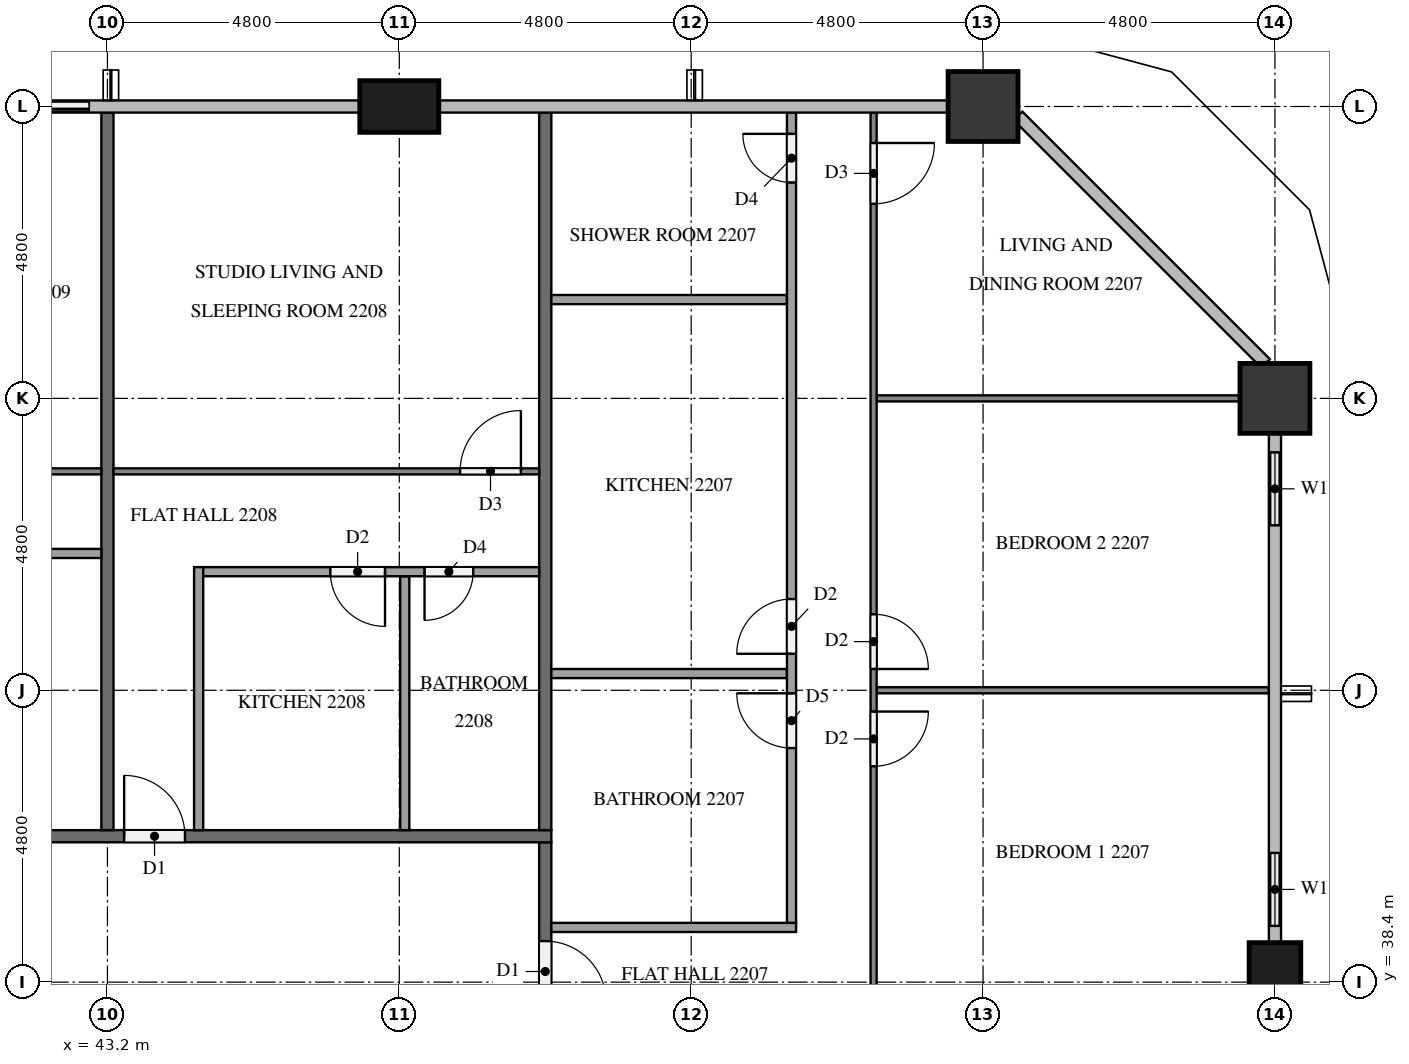
"""IFC4 building model, lengths in metres.
Left out: names, types, materials, properties, quantities, classifications, styles, units other than length and angle.
Written with IfcOpenShell. Run it as: python <this file> out.ifc"""

import sys

from ifc_helpers import new_model, si_unit, direction, frame, frame_2d, origin, origin_2d, place, context, subcontext, project, spatial, rectangle, extrude, element, fill, save


model = new_model("IFC4")
c1 = context("Model", 3, precision=1e-05, world=origin(), true_north=direction((0.0, 1.0)))
c2 = subcontext(c1, "Body", "Model", "MODEL_VIEW")
j1 = project(units=[si_unit("LENGTHUNIT", "METRE"), si_unit("PLANEANGLEUNIT", "RADIAN")], contexts=[c1])
p1 = place(None, origin())
s1 = spatial("IfcSite", under=j1, at=p1, CompositionType="ELEMENT")
p2 = place(p1, origin())
s2 = spatial("IfcBuilding", under=s1, at=p2, CompositionType="ELEMENT")
p3 = place(p2, frame((0.0, 0.0, 89.2)))
s3 = spatial("IfcBuildingStorey", under=s2, at=p3, CompositionType="ELEMENT", Elevation=89.2)
p4 = place(p3, frame((62.4, 38.4, 0.0), z_axis=(0.0, 0.0, 1.0), x_axis=(0.0, 1.0, 0.0)))
e1 = element("IfcColumn", 1, at=p4, inside=s3, PredefinedType="COLUMN", context=c2, shape_type="SweptSolid", body=[
    extrude(rectangle(XDim=1.3, YDim=0.85, at=origin_2d()), origin(), (0.0, 0.0, 1.0), 3.2),
])
for number, where, z_axis, x_axis in (
    (2, (62.4, 48.0, 0.0), (0.0, 0.0, 1.0), (1.0, 0.0, 0.0)),
    (3, (57.6, 52.8, 0.0), (0.0, 0.0, 1.0), (1.0, 0.0, 0.0)),
):
    element("IfcColumn", number, at=place(p3, frame(where, z_axis=z_axis, x_axis=x_axis)), inside=s3, PredefinedType="COLUMN", context=c2, shape_type="SweptSolid", body=[
        extrude(rectangle(XDim=1.15, YDim=1.15, at=origin_2d()), origin(), (0.0, 0.0, 1.0), 3.2),
    ])
p5 = place(p3, frame((48.0, 52.8, 0.0), z_axis=(0.0, 0.0, 1.0), x_axis=(1.0, 0.0, 0.0)))
e4 = element("IfcColumn", 4, at=p5, inside=s3, PredefinedType="COLUMN", context=c2, shape_type="SweptSolid", body=[
    extrude(rectangle(XDim=1.3, YDim=0.85, at=origin_2d()), origin(), (0.0, 0.0, 1.0), 3.2),
])
p6 = place(p3, frame((62.4, 39.05, 0.0), z_axis=(0.0, 0.0, 1.0), x_axis=(0.0, 1.0, 0.0)))
e5 = element("IfcWall", 5, at=p6, inside=s3, PredefinedType="SOLIDWALL", context=c2, shape_type="SweptSolid", body=[
    extrude(rectangle(XDim=1.75, YDim=0.15, at=frame_2d((0.875, 0.0))), origin(), (0.0, 0.0, 1.0), 3.2),
])
p7 = place(p6, frame((0.275, 0.0, 0.9)))
e6 = element("IfcOpeningElement", 6, at=p7, cuts=e5, PredefinedType="OPENING", context=c2, shape_type="SweptSolid", body=[
    extrude(rectangle(XDim=1.2, YDim=1.4, at=frame_2d((0.6, 0.7))), frame((0.0, 0.085, 0.0), z_axis=(0.0, -1.0, 0.0), x_axis=(1.0, 0.0, 0.0)), (0.0, 0.0, 1.0), 0.17),
])
p8 = place(p3, frame((62.4, 45.6, 0.0), z_axis=(0.0, 0.0, 1.0), x_axis=(0.0, 1.0, 0.0)))
e7 = element("IfcWall", 7, at=p8, inside=s3, PredefinedType="SOLIDWALL", context=c2, shape_type="SweptSolid", body=[
    extrude(rectangle(XDim=1.825, YDim=0.15, at=frame_2d((0.913, 0.0))), origin(), (0.0, 0.0, 1.0), 3.2),
])
p9 = place(p8, frame((0.312, 0.0, 0.9)))
e8 = element("IfcOpeningElement", 8, at=p9, cuts=e7, PredefinedType="OPENING", context=c2, shape_type="SweptSolid", body=[
    extrude(rectangle(XDim=1.2, YDim=1.4, at=frame_2d((0.6, 0.7))), frame((0.0, 0.085, 0.0), z_axis=(0.0, -1.0, 0.0), x_axis=(1.0, 0.0, 0.0)), (0.0, 0.0, 1.0), 0.17),
])
p10 = place(p3, frame((43.2, 52.8, 0.0), z_axis=(0.0, 0.0, 1.0), x_axis=(-1.0, 0.0, 0.0)))
e9 = element("IfcWall", 9, at=p10, inside=s3, PredefinedType="SOLIDWALL", context=c2, shape_type="SweptSolid", body=[
    extrude(rectangle(XDim=2.4, YDim=0.15, at=frame_2d((1.2, 0.0))), origin(), (0.0, 0.0, 1.0), 3.2),
])
p11 = place(p10, frame((0.3, 0.0, 0.0)))
e10 = element("IfcOpeningElement", 10, at=p11, cuts=e9, PredefinedType="OPENING", context=c2, shape_type="SweptSolid", body=[
    extrude(rectangle(XDim=1.8, YDim=2.4, at=frame_2d((0.9, 1.2))), frame((0.0, 0.085, 0.0), z_axis=(0.0, -1.0, 0.0), x_axis=(1.0, 0.0, 0.0)), (0.0, 0.0, 1.0), 0.17),
])
p12 = place(p3, frame((50.4, 40.7, 0.0), z_axis=(0.0, 0.0, 1.0), x_axis=(0.0, -1.0, 0.0)))
e11 = element("IfcWall", 11, at=p12, inside=s3, PredefinedType="PARTITIONING", context=c2, shape_type="SweptSolid", body=[
    extrude(rectangle(XDim=2.8, YDim=0.2, at=frame_2d((1.4, 0.0))), origin(), (0.0, 0.0, 1.0), 3.2),
])
p13 = place(p12, frame((1.625, 0.0, 0.0)))
e12 = element("IfcOpeningElement", 12, at=p13, cuts=e11, PredefinedType="OPENING", context=c2, shape_type="SweptSolid", body=[
    extrude(rectangle(XDim=1.0, YDim=2.1, at=frame_2d((0.5, 1.05))), frame((0.0, 0.11, 0.0), z_axis=(0.0, -1.0, 0.0), x_axis=(1.0, 0.0, 0.0)), (0.0, 0.0, 1.0), 0.22),
])
p14 = place(p3, frame((11.9, 40.8, 0.0), z_axis=(0.0, 0.0, 1.0), x_axis=(1.0, 0.0, 0.0)))
e13 = element("IfcWall", 13, at=p14, inside=s3, PredefinedType="PARTITIONING", context=c2, shape_type="SweptSolid", body=[
    extrude(rectangle(XDim=38.6, YDim=0.2, at=frame_2d((19.3, 0.0))), origin(), (0.0, 0.0, 1.0), 3.2),
])
p15 = place(p14, frame((31.575, 0.0, 0.0)))
e14 = element("IfcOpeningElement", 14, at=p15, cuts=e13, PredefinedType="OPENING", context=c2, shape_type="SweptSolid", body=[
    extrude(rectangle(XDim=1.0, YDim=2.1, at=frame_2d((0.5, 1.05))), frame((0.0, 0.11, 0.0), z_axis=(0.0, -1.0, 0.0), x_axis=(1.0, 0.0, 0.0)), (0.0, 0.0, 1.0), 0.22),
])
p16 = place(p14, frame((14.775, 0.0, 0.0)))
e15 = element("IfcOpeningElement", 15, at=p16, cuts=e13, PredefinedType="OPENING", context=c2, shape_type="SweptSolid", body=[
    extrude(rectangle(XDim=1.0, YDim=2.1, at=frame_2d((0.5, 1.05))), frame((0.0, 0.11, 0.0), z_axis=(0.0, -1.0, 0.0), x_axis=(1.0, 0.0, 0.0)), (0.0, 0.0, 1.0), 0.22),
])
p17 = place(p14, frame((0.375, 0.0, 0.0)))
e16 = element("IfcOpeningElement", 16, at=p17, cuts=e13, PredefinedType="OPENING", context=c2, shape_type="SweptSolid", body=[
    extrude(rectangle(XDim=1.0, YDim=2.1, at=frame_2d((0.5, 1.05))), frame((0.0, 0.11, 0.0), z_axis=(0.0, -1.0, 0.0), x_axis=(1.0, 0.0, 0.0)), (0.0, 0.0, 1.0), 0.22),
])
for number, where, z_axis, x_axis in (
    (17, (50.4, 40.9, 0.0), (0.0, 0.0, 1.0), (0.0, 1.0, 0.0)),
    (18, (43.2, 52.7, 0.0), (0.0, 0.0, 1.0), (0.0, -1.0, 0.0)),
):
    element("IfcWall", number, at=place(p3, frame(where, z_axis=z_axis, x_axis=x_axis)), inside=s3, PredefinedType="PARTITIONING", context=c2, shape_type="SweptSolid", body=[
        extrude(rectangle(XDim=11.8, YDim=0.2, at=frame_2d((5.9, 0.0))), origin(), (0.0, 0.0, 1.0), 3.2),
    ])
p18 = place(p3, frame((55.85, 43.2, 0.0), z_axis=(0.0, 0.0, 1.0), x_axis=(1.0, 0.0, 0.0)))
e19 = element("IfcWall", 19, at=p18, inside=s3, PredefinedType="PARTITIONING", context=c2, shape_type="SweptSolid", body=[
    extrude(rectangle(XDim=6.45, YDim=0.1, at=frame_2d((3.225, 0.0))), origin(), (0.0, 0.0, 1.0), 3.2),
])
p19 = place(p3, frame((55.85, 48.0, 0.0), z_axis=(0.0, 0.0, 1.0), x_axis=(1.0, 0.0, 0.0)))
e20 = element("IfcWall", 20, at=p19, inside=s3, PredefinedType="PARTITIONING", context=c2, shape_type="SweptSolid", body=[
    extrude(rectangle(XDim=5.975, YDim=0.1, at=frame_2d((2.987, 0.0))), origin(), (0.0, 0.0, 1.0), 3.2),
])
p20 = place(p3, frame((55.8, 52.7, 0.0), z_axis=(0.0, 0.0, 1.0), x_axis=(0.0, -1.0, 0.0)))
e21 = element("IfcWall", 21, at=p20, inside=s3, PredefinedType="PARTITIONING", context=c2, shape_type="SweptSolid", body=[
    extrude(rectangle(XDim=14.8, YDim=0.1, at=frame_2d((7.4, 0.0))), origin(), (0.0, 0.0, 1.0), 3.2),
])
p21 = place(p20, frame((9.85, 0.0, 0.0)))
e22 = element("IfcOpeningElement", 22, at=p21, cuts=e21, PredefinedType="OPENING", context=c2, shape_type="SweptSolid", body=[
    extrude(rectangle(XDim=0.9, YDim=2.1, at=frame_2d((0.45, 1.05))), frame((0.0, 0.06, 0.0), z_axis=(0.0, -1.0, 0.0), x_axis=(1.0, 0.0, 0.0)), (0.0, 0.0, 1.0), 0.12),
])
p22 = place(p20, frame((8.25, 0.0, 0.0)))
e23 = element("IfcOpeningElement", 23, at=p22, cuts=e21, PredefinedType="OPENING", context=c2, shape_type="SweptSolid", body=[
    extrude(rectangle(XDim=0.9, YDim=2.1, at=frame_2d((0.45, 1.05))), frame((0.0, 0.06, 0.0), z_axis=(0.0, -1.0, 0.0), x_axis=(1.0, 0.0, 0.0)), (0.0, 0.0, 1.0), 0.12),
])
p23 = place(p20, frame((0.5, 0.0, 0.0)))
e24 = element("IfcOpeningElement", 24, at=p23, cuts=e21, PredefinedType="OPENING", context=c2, shape_type="SweptSolid", body=[
    extrude(rectangle(XDim=1.0, YDim=2.1, at=frame_2d((0.5, 1.05))), frame((0.0, 0.06, 0.0), z_axis=(0.0, -1.0, 0.0), x_axis=(1.0, 0.0, 0.0)), (0.0, 0.0, 1.0), 0.12),
])
for number, where, z_axis, x_axis in (
    (25, (50.5, 43.475, 0.0), (0.0, 0.0, 1.0), (1.0, 0.0, 0.0)),
    (26, (50.5, 49.625, 0.0), (0.0, 0.0, 1.0), (1.0, 0.0, 0.0)),
):
    element("IfcWall", number, at=place(p3, frame(where, z_axis=z_axis, x_axis=x_axis)), inside=s3, PredefinedType="PARTITIONING", context=c2, shape_type="SweptSolid", body=[
        extrude(rectangle(XDim=3.875, YDim=0.15, at=frame_2d((1.938, 0.0))), origin(), (0.0, 0.0, 1.0), 3.2),
    ])
p24 = place(p3, frame((50.5, 39.3, 0.0), z_axis=(0.0, 0.0, 1.0), x_axis=(1.0, 0.0, 0.0)))
e27 = element("IfcWall", 27, at=p24, inside=s3, PredefinedType="PARTITIONING", context=c2, shape_type="SweptSolid", body=[
    extrude(rectangle(XDim=4.025, YDim=0.15, at=frame_2d((2.012, 0.0))), origin(), (0.0, 0.0, 1.0), 3.2),
])
p25 = place(p3, frame((54.45, 39.375, 0.0), z_axis=(0.0, 0.0, 1.0), x_axis=(0.0, 1.0, 0.0)))
e28 = element("IfcWall", 28, at=p25, inside=s3, PredefinedType="PARTITIONING", context=c2, shape_type="SweptSolid", body=[
    extrude(rectangle(XDim=13.325, YDim=0.15, at=frame_2d((6.663, 0.0))), origin(), (0.0, 0.0, 1.0), 3.2),
])
p26 = place(p25, frame((2.875, 0.0, 0.0)))
e29 = element("IfcOpeningElement", 29, at=p26, cuts=e28, PredefinedType="OPENING", context=c2, shape_type="SweptSolid", body=[
    extrude(rectangle(XDim=0.9, YDim=2.1, at=frame_2d((0.45, 1.05))), frame((0.0, 0.085, 0.0), z_axis=(0.0, -1.0, 0.0), x_axis=(1.0, 0.0, 0.0)), (0.0, 0.0, 1.0), 0.17),
])
p27 = place(p25, frame((4.425, 0.0, 0.0)))
e30 = element("IfcOpeningElement", 30, at=p27, cuts=e28, PredefinedType="OPENING", context=c2, shape_type="SweptSolid", body=[
    extrude(rectangle(XDim=0.9, YDim=2.1, at=frame_2d((0.45, 1.05))), frame((0.0, 0.085, 0.0), z_axis=(0.0, -1.0, 0.0), x_axis=(1.0, 0.0, 0.0)), (0.0, 0.0, 1.0), 0.17),
])
p28 = place(p25, frame((12.175, 0.0, 0.0)))
e31 = element("IfcOpeningElement", 31, at=p28, cuts=e28, PredefinedType="OPENING", context=c2, shape_type="SweptSolid", body=[
    extrude(rectangle(XDim=0.8, YDim=2.1, at=frame_2d((0.4, 1.05))), frame((0.0, 0.085, 0.0), z_axis=(0.0, -1.0, 0.0), x_axis=(1.0, 0.0, 0.0)), (0.0, 0.0, 1.0), 0.17),
])
p29 = place(p3, frame((43.3, 46.8, 0.0), z_axis=(0.0, 0.0, 1.0), x_axis=(1.0, 0.0, 0.0)))
e32 = element("IfcWall", 32, at=p29, inside=s3, PredefinedType="PARTITIONING", context=c2, shape_type="SweptSolid", body=[
    extrude(rectangle(XDim=7.0, YDim=0.1, at=frame_2d((3.5, 0.0))), origin(), (0.0, 0.0, 1.0), 3.2),
])
p30 = place(p29, frame((5.7, 0.0, 0.0)))
e33 = element("IfcOpeningElement", 33, at=p30, cuts=e32, PredefinedType="OPENING", context=c2, shape_type="SweptSolid", body=[
    extrude(rectangle(XDim=1.0, YDim=2.1, at=frame_2d((0.5, 1.05))), frame((0.0, 0.06, 0.0), z_axis=(0.0, -1.0, 0.0), x_axis=(1.0, 0.0, 0.0)), (0.0, 0.0, 1.0), 0.12),
])
p31 = place(p3, frame((48.09, 40.9, 0.0), z_axis=(0.0, 0.0, 1.0), x_axis=(0.0, 1.0, 0.0)))
e34 = element("IfcWall", 34, at=p31, inside=s3, PredefinedType="PARTITIONING", context=c2, shape_type="SweptSolid", body=[
    extrude(rectangle(XDim=4.175, YDim=0.15, at=frame_2d((2.087, 0.0))), origin(), (0.0, 0.0, 1.0), 3.2),
])
p32 = place(p3, frame((44.7, 40.9, 0.0), z_axis=(0.0, 0.0, 1.0), x_axis=(0.0, 1.0, 0.0)))
e35 = element("IfcWall", 35, at=p32, inside=s3, PredefinedType="PARTITIONING", context=c2, shape_type="SweptSolid", body=[
    extrude(rectangle(XDim=4.325, YDim=0.15, at=frame_2d((2.163, 0.0))), origin(), (0.0, 0.0, 1.0), 3.2),
])
p33 = place(p3, frame((50.3, 45.15, 0.0), z_axis=(0.0, 0.0, 1.0), x_axis=(-1.0, 0.0, 0.0)))
e36 = element("IfcWall", 36, at=p33, inside=s3, PredefinedType="PARTITIONING", context=c2, shape_type="SweptSolid", body=[
    extrude(rectangle(XDim=5.525, YDim=0.15, at=frame_2d((2.763, 0.0))), origin(), (0.0, 0.0, 1.0), 3.2),
])
p34 = place(p33, frame((2.535, 0.0, 0.0)))
e37 = element("IfcOpeningElement", 37, at=p34, cuts=e36, PredefinedType="OPENING", context=c2, shape_type="SweptSolid", body=[
    extrude(rectangle(XDim=0.9, YDim=2.1, at=frame_2d((0.45, 1.05))), frame((0.0, 0.085, 0.0), z_axis=(0.0, -1.0, 0.0), x_axis=(1.0, 0.0, 0.0)), (0.0, 0.0, 1.0), 0.17),
])
p35 = place(p33, frame((1.085, 0.0, 0.0)))
e38 = element("IfcOpeningElement", 38, at=p35, cuts=e36, PredefinedType="OPENING", context=c2, shape_type="SweptSolid", body=[
    extrude(rectangle(XDim=0.8, YDim=2.1, at=frame_2d((0.4, 1.05))), frame((0.0, 0.085, 0.0), z_axis=(0.0, -1.0, 0.0), x_axis=(1.0, 0.0, 0.0)), (0.0, 0.0, 1.0), 0.17),
])
p36 = place(p3, frame((26.5, 46.8, 0.0), z_axis=(0.0, 0.0, 1.0), x_axis=(1.0, 0.0, 0.0)))
e39 = element("IfcWall", 39, at=p36, inside=s3, PredefinedType="PARTITIONING", context=c2, shape_type="SweptSolid", body=[
    extrude(rectangle(XDim=16.6, YDim=0.1, at=frame_2d((8.3, 0.0))), origin(), (0.0, 0.0, 1.0), 3.2),
])
p37 = place(p36, frame((0.3, 0.0, 0.0)))
e40 = element("IfcOpeningElement", 40, at=p37, cuts=e39, PredefinedType="OPENING", context=c2, shape_type="SweptSolid", body=[
    extrude(rectangle(XDim=0.9, YDim=2.1, at=frame_2d((0.45, 1.05))), frame((0.0, 0.06, 0.0), z_axis=(0.0, -1.0, 0.0), x_axis=(1.0, 0.0, 0.0)), (0.0, 0.0, 1.0), 0.12),
])
p38 = place(p36, frame((8.25, 0.0, 0.0)))
e41 = element("IfcOpeningElement", 41, at=p38, cuts=e39, PredefinedType="OPENING", context=c2, shape_type="SweptSolid", body=[
    extrude(rectangle(XDim=0.9, YDim=2.1, at=frame_2d((0.45, 1.05))), frame((0.0, 0.06, 0.0), z_axis=(0.0, -1.0, 0.0), x_axis=(1.0, 0.0, 0.0)), (0.0, 0.0, 1.0), 0.12),
])
p39 = place(p36, frame((9.85, 0.0, 0.0)))
e42 = element("IfcOpeningElement", 42, at=p39, cuts=e39, PredefinedType="OPENING", context=c2, shape_type="SweptSolid", body=[
    extrude(rectangle(XDim=1.0, YDim=2.1, at=frame_2d((0.5, 1.05))), frame((0.0, 0.06, 0.0), z_axis=(0.0, -1.0, 0.0), x_axis=(1.0, 0.0, 0.0)), (0.0, 0.0, 1.0), 0.12),
])
p40 = place(p3, frame((43.1, 45.45, 0.0), z_axis=(0.0, 0.0, 1.0), x_axis=(-1.0, 0.0, 0.0)))
e43 = element("IfcWall", 43, at=p40, inside=s3, PredefinedType="PARTITIONING", context=c2, shape_type="SweptSolid", body=[
    extrude(rectangle(XDim=15.125, YDim=0.15, at=frame_2d((7.562, 0.0))), origin(), (0.0, 0.0, 1.0), 3.2),
])
p41 = place(p40, frame((13.925, 0.0, 0.0)))
e44 = element("IfcOpeningElement", 44, at=p41, cuts=e43, PredefinedType="OPENING", context=c2, shape_type="SweptSolid", body=[
    extrude(rectangle(XDim=0.9, YDim=2.1, at=frame_2d((0.45, 1.05))), frame((0.0, 0.085, 0.0), z_axis=(0.0, -1.0, 0.0), x_axis=(1.0, 0.0, 0.0)), (0.0, 0.0, 1.0), 0.17),
])
p42 = place(p40, frame((4.979, 0.0, 0.0)))
e45 = element("IfcOpeningElement", 45, at=p42, cuts=e43, PredefinedType="OPENING", context=c2, shape_type="SweptSolid", body=[
    extrude(rectangle(XDim=0.8, YDim=2.1, at=frame_2d((0.4, 1.05))), frame((0.0, 0.085, 0.0), z_axis=(0.0, -1.0, 0.0), x_axis=(1.0, 0.0, 0.0)), (0.0, 0.0, 1.0), 0.17),
])
p43 = place(p40, frame((3.429, 0.0, 0.0)))
e46 = element("IfcOpeningElement", 46, at=p43, cuts=e43, PredefinedType="OPENING", context=c2, shape_type="SweptSolid", body=[
    extrude(rectangle(XDim=0.9, YDim=2.1, at=frame_2d((0.45, 1.05))), frame((0.0, 0.085, 0.0), z_axis=(0.0, -1.0, 0.0), x_axis=(1.0, 0.0, 0.0)), (0.0, 0.0, 1.0), 0.17),
])
p44 = place(p7, origin())
e47 = element("IfcWindow", 47, at=p44, inside=s3, PartitioningType="SINGLE_PANEL", PredefinedType="WINDOW", context=c2, shape_type="SweptSolid", body=[
    extrude(rectangle(XDim=1.2, YDim=1.4, at=frame_2d((0.6, 0.7))), frame((0.0, 0.03, 0.0), z_axis=(0.0, -1.0, 0.0), x_axis=(1.0, 0.0, 0.0)), (0.0, 0.0, 1.0), 0.06),
])
fill(e6, e47)
p45 = place(p9, origin())
e48 = element("IfcWindow", 48, at=p45, inside=s3, PartitioningType="SINGLE_PANEL", PredefinedType="WINDOW", context=c2, shape_type="SweptSolid", body=[
    extrude(rectangle(XDim=1.2, YDim=1.4, at=frame_2d((0.6, 0.7))), frame((0.0, 0.03, 0.0), z_axis=(0.0, -1.0, 0.0), x_axis=(1.0, 0.0, 0.0)), (0.0, 0.0, 1.0), 0.06),
])
fill(e8, e48)
p46 = place(p11, origin())
e49 = element("IfcDoor", 49, at=p46, inside=s3, OperationType="SLIDING_TO_RIGHT", PredefinedType="DOOR", context=c2, shape_type="SweptSolid", body=[
    extrude(rectangle(XDim=1.8, YDim=2.4, at=frame_2d((0.9, 1.2))), frame((0.0, 0.025, 0.0), z_axis=(0.0, -1.0, 0.0), x_axis=(1.0, 0.0, 0.0)), (0.0, 0.0, 1.0), 0.05),
])
fill(e10, e49)
p47 = place(p13, origin())
e50 = element("IfcDoor", 50, at=p47, inside=s3, OperationType="SINGLE_SWING_RIGHT", PredefinedType="DOOR", context=c2, shape_type="SweptSolid", body=[
    extrude(rectangle(XDim=1.0, YDim=2.1, at=frame_2d((0.5, 1.05))), frame((0.0, 0.025, 0.0), z_axis=(0.0, -1.0, 0.0), x_axis=(1.0, 0.0, 0.0)), (0.0, 0.0, 1.0), 0.05),
])
fill(e12, e50)
p48 = place(p15, origin())
e51 = element("IfcDoor", 51, at=p48, inside=s3, OperationType="SINGLE_SWING_LEFT", PredefinedType="DOOR", context=c2, shape_type="SweptSolid", body=[
    extrude(rectangle(XDim=1.0, YDim=2.1, at=frame_2d((0.5, 1.05))), frame((0.0, 0.025, 0.0), z_axis=(0.0, -1.0, 0.0), x_axis=(1.0, 0.0, 0.0)), (0.0, 0.0, 1.0), 0.05),
])
fill(e14, e51)
p49 = place(p21, origin())
e52 = element("IfcDoor", 52, at=p49, inside=s3, OperationType="SINGLE_SWING_LEFT", PredefinedType="DOOR", context=c2, shape_type="SweptSolid", body=[
    extrude(rectangle(XDim=0.9, YDim=2.1, at=frame_2d((0.45, 1.05))), frame((0.0, 0.025, 0.0), z_axis=(0.0, -1.0, 0.0), x_axis=(1.0, 0.0, 0.0)), (0.0, 0.0, 1.0), 0.05),
])
fill(e22, e52)
p50 = place(p22, origin())
e53 = element("IfcDoor", 53, at=p50, inside=s3, OperationType="SINGLE_SWING_RIGHT", PredefinedType="DOOR", context=c2, shape_type="SweptSolid", body=[
    extrude(rectangle(XDim=0.9, YDim=2.1, at=frame_2d((0.45, 1.05))), frame((0.0, 0.025, 0.0), z_axis=(0.0, -1.0, 0.0), x_axis=(1.0, 0.0, 0.0)), (0.0, 0.0, 1.0), 0.05),
])
fill(e23, e53)
p51 = place(p23, origin())
e54 = element("IfcDoor", 54, at=p51, inside=s3, OperationType="SINGLE_SWING_LEFT", PredefinedType="DOOR", context=c2, shape_type="SweptSolid", body=[
    extrude(rectangle(XDim=1.0, YDim=2.1, at=frame_2d((0.5, 1.05))), frame((0.0, 0.025, 0.0), z_axis=(0.0, -1.0, 0.0), x_axis=(1.0, 0.0, 0.0)), (0.0, 0.0, 1.0), 0.05),
])
fill(e24, e54)
p52 = place(p26, origin())
e55 = element("IfcDoor", 55, at=p52, inside=s3, OperationType="SINGLE_SWING_RIGHT", PredefinedType="DOOR", context=c2, shape_type="SweptSolid", body=[
    extrude(rectangle(XDim=0.9, YDim=2.1, at=frame_2d((0.45, 1.05))), frame((0.0, 0.025, 0.0), z_axis=(0.0, -1.0, 0.0), x_axis=(1.0, 0.0, 0.0)), (0.0, 0.0, 1.0), 0.05),
])
fill(e29, e55)
p53 = place(p27, origin())
e56 = element("IfcDoor", 56, at=p53, inside=s3, OperationType="SINGLE_SWING_LEFT", PredefinedType="DOOR", context=c2, shape_type="SweptSolid", body=[
    extrude(rectangle(XDim=0.9, YDim=2.1, at=frame_2d((0.45, 1.05))), frame((0.0, 0.025, 0.0), z_axis=(0.0, -1.0, 0.0), x_axis=(1.0, 0.0, 0.0)), (0.0, 0.0, 1.0), 0.05),
])
fill(e30, e56)
p54 = place(p28, origin())
e57 = element("IfcDoor", 57, at=p54, inside=s3, OperationType="SINGLE_SWING_RIGHT", PredefinedType="DOOR", context=c2, shape_type="SweptSolid", body=[
    extrude(rectangle(XDim=0.8, YDim=2.1, at=frame_2d((0.4, 1.05))), frame((0.0, 0.025, 0.0), z_axis=(0.0, -1.0, 0.0), x_axis=(1.0, 0.0, 0.0)), (0.0, 0.0, 1.0), 0.05),
])
fill(e31, e57)
p55 = place(p30, origin())
e58 = element("IfcDoor", 58, at=p55, inside=s3, OperationType="SINGLE_SWING_RIGHT", PredefinedType="DOOR", context=c2, shape_type="SweptSolid", body=[
    extrude(rectangle(XDim=1.0, YDim=2.1, at=frame_2d((0.5, 1.05))), frame((0.0, 0.025, 0.0), z_axis=(0.0, -1.0, 0.0), x_axis=(1.0, 0.0, 0.0)), (0.0, 0.0, 1.0), 0.05),
])
fill(e33, e58)
p56 = place(p34, origin())
e59 = element("IfcDoor", 59, at=p56, inside=s3, OperationType="SINGLE_SWING_LEFT", PredefinedType="DOOR", context=c2, shape_type="SweptSolid", body=[
    extrude(rectangle(XDim=0.9, YDim=2.1, at=frame_2d((0.45, 1.05))), frame((0.0, 0.025, 0.0), z_axis=(0.0, -1.0, 0.0), x_axis=(1.0, 0.0, 0.0)), (0.0, 0.0, 1.0), 0.05),
])
fill(e37, e59)
p57 = place(p35, origin())
e60 = element("IfcDoor", 60, at=p57, inside=s3, OperationType="SINGLE_SWING_RIGHT", PredefinedType="DOOR", context=c2, shape_type="SweptSolid", body=[
    extrude(rectangle(XDim=0.8, YDim=2.1, at=frame_2d((0.4, 1.05))), frame((0.0, 0.025, 0.0), z_axis=(0.0, -1.0, 0.0), x_axis=(1.0, 0.0, 0.0)), (0.0, 0.0, 1.0), 0.05),
])
fill(e38, e60)
save(model, sys.argv[1])
